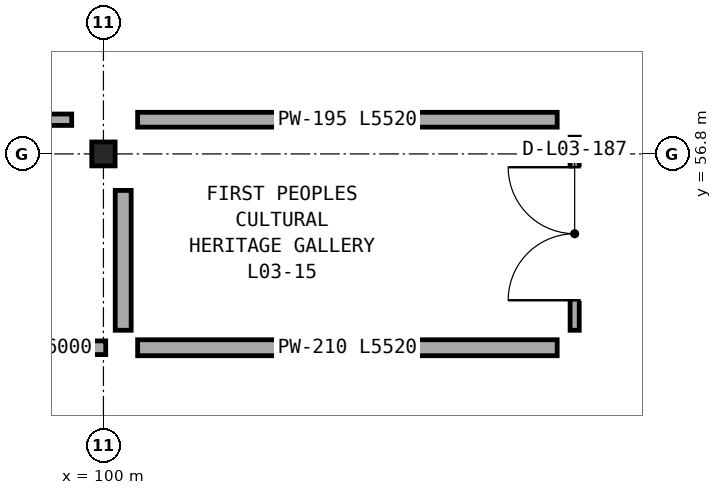
"""IFC4 building model, lengths in metres.
Left out: names, types, materials, properties, quantities, classifications, styles, units other than length and angle.
Written with IfcOpenShell. Run it as: python <this file> out.ifc"""

import sys

from ifc_helpers import new_model, si_unit, direction, frame, frame_2d, origin, origin_2d, place, context, subcontext, project, spatial, rectangle, i_section, extrude, element, fill, save


model = new_model("IFC4")
c1 = context("Model", 3, precision=1e-05, world=origin(), true_north=direction((0.0, 1.0)))
c2 = subcontext(c1, "Body", "Model", "MODEL_VIEW")
j1 = project(units=[si_unit("LENGTHUNIT", "METRE"), si_unit("PLANEANGLEUNIT", "RADIAN")], contexts=[c1])
p1 = place(None, origin())
s1 = spatial("IfcSite", under=j1, at=p1, CompositionType="ELEMENT")
p2 = place(p1, origin())
s2 = spatial("IfcBuilding", under=s1, at=p2, CompositionType="ELEMENT")
p3 = place(p2, frame((0.0, 0.0, 14.6)))
s3 = spatial("IfcBuildingStorey", under=s2, at=p3, CompositionType="ELEMENT", Elevation=14.6)
p4 = place(p3, frame((100.0, 56.8, 0.0), z_axis=(0.0, 0.0, 1.0), x_axis=(1.0, 0.0, 0.0)))
e1 = element("IfcColumn", 1, at=p4, inside=s3, PredefinedType="COLUMN", context=c2, shape_type="SweptSolid", body=[
    extrude(i_section(OverallWidth=0.307, OverallDepth=0.315, WebThickness=0.012, FlangeThickness=0.019, FilletRadius=0.017, at=origin_2d()), origin(), (0.0, 0.0, 1.0), 4.5),
])
p5 = place(p3, frame((100.03, 54.25, 0.0), z_axis=(0.0, 0.0, 1.0), x_axis=(-1.0, 0.0, 0.0)))
e2 = element("IfcWall", 2, at=p5, inside=s3, PredefinedType="PARTITIONING", context=c2, shape_type="SweptSolid", body=[
    extrude(rectangle(XDim=6.0, YDim=0.18, at=frame_2d((3.0, 0.0))), origin(), (0.0, 0.0, 1.0), 3.743),
])
p6 = place(p5, frame((2.2, 0.0, 0.0)))
e3 = element("IfcOpeningElement", 3, at=p6, cuts=e2, PredefinedType="OPENING", context=c2, shape_type="SweptSolid", body=[
    extrude(rectangle(XDim=1.6, YDim=2.1, at=frame_2d((0.8, 1.05))), frame((0.0, 0.1, 0.0), z_axis=(0.0, -1.0, 0.0), x_axis=(1.0, 0.0, 0.0)), (0.0, 0.0, 1.0), 0.2),
])
p7 = place(p3, frame((94.03, 57.25, 0.0), z_axis=(0.0, 0.0, 1.0), x_axis=(1.0, 0.0, 0.0)))
e4 = element("IfcWall", 4, at=p7, inside=s3, PredefinedType="PARTITIONING", context=c2, shape_type="SweptSolid", body=[
    extrude(rectangle(XDim=5.552, YDim=0.15, at=frame_2d((2.776, 0.0))), origin(), (0.0, 0.0, 1.0), 4.13),
])
p8 = place(p3, frame((106.2, 57.02, 0.0), z_axis=(0.0, 0.0, 1.0), x_axis=(0.0, -1.0, 0.0)))
e5 = element("IfcWall", 5, at=p8, inside=s3, PredefinedType="PARTITIONING", context=c2, shape_type="SweptSolid", body=[
    extrude(rectangle(XDim=2.54, YDim=0.12, at=frame_2d((1.27, 0.0))), origin(), (0.0, 0.0, 1.0), 3.667),
])
p9 = place(p8, frame((0.395, 0.0, 0.0)))
e6 = element("IfcOpeningElement", 6, at=p9, cuts=e5, PredefinedType="OPENING", context=c2, shape_type="SweptSolid", body=[
    extrude(rectangle(XDim=1.75, YDim=2.58, at=frame_2d((0.875, 1.29))), frame((0.0, 0.07, 0.0), z_axis=(0.0, -1.0, 0.0), x_axis=(1.0, 0.0, 0.0)), (0.0, 0.0, 1.0), 0.14),
])
p10 = place(p3, frame((105.97, 54.25, 0.0), z_axis=(0.0, 0.0, 1.0), x_axis=(-1.0, 0.0, 0.0)))
e7 = element("IfcWall", 7, at=p10, inside=s3, PredefinedType="PARTITIONING", context=c2, shape_type="SweptSolid", body=[
    extrude(rectangle(XDim=5.52, YDim=0.21, at=frame_2d((2.76, 0.0))), origin(), (0.0, 0.0, 1.0), 3.993),
])
p11 = place(p3, frame((100.45, 57.25, 0.0), z_axis=(0.0, 0.0, 1.0), x_axis=(1.0, 0.0, 0.0)))
e8 = element("IfcWall", 8, at=p11, inside=s3, PredefinedType="PARTITIONING", context=c2, shape_type="SweptSolid", body=[
    extrude(rectangle(XDim=5.52, YDim=0.195, at=frame_2d((2.76, 0.0))), origin(), (0.0, 0.0, 1.0), 4.13),
])
p12 = place(p3, frame((100.26, 56.32, 0.0), z_axis=(0.0, 0.0, 1.0), x_axis=(0.0, -1.0, 0.0)))
e9 = element("IfcWall", 9, at=p12, inside=s3, PredefinedType="PARTITIONING", context=c2, shape_type="SweptSolid", body=[
    extrude(rectangle(XDim=1.84, YDim=0.21, at=frame_2d((0.92, 0.0))), origin(), (0.0, 0.0, 1.0), 3.743),
])
p13 = place(p9, frame((1.75, 0.0, 0.0), z_axis=(0.0, 0.0, 1.0), x_axis=(-1.0, 0.0, 0.0)))
e10 = element("IfcDoor", 10, at=p13, inside=s3, OperationType="DOUBLE_DOOR_SINGLE_SWING", PredefinedType="DOOR", context=c2, shape_type="SweptSolid", body=[
    extrude(rectangle(XDim=1.75, YDim=2.58, at=frame_2d((0.875, 1.29))), frame((0.0, 0.025, 0.0), z_axis=(0.0, -1.0, 0.0), x_axis=(1.0, 0.0, 0.0)), (0.0, 0.0, 1.0), 0.05),
])
fill(e6, e10)
save(model, sys.argv[1])
